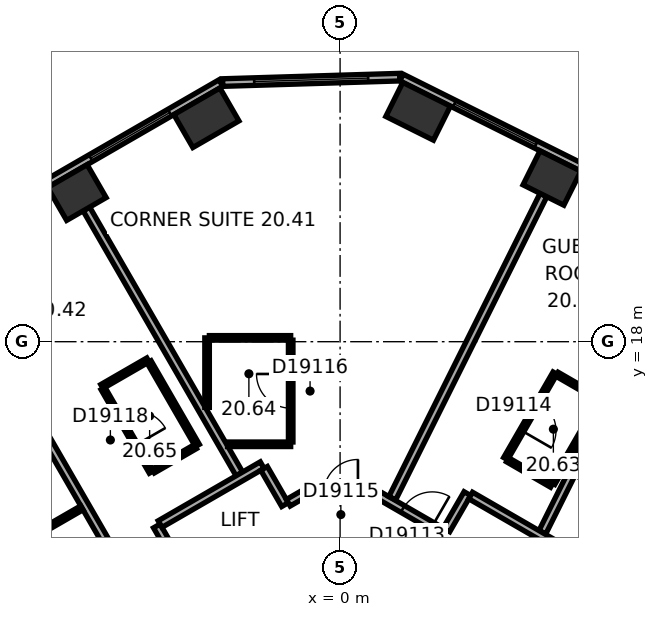
"""IFC4 building model, lengths in metres.
Left out: names, types, materials, properties, quantities, classifications, styles, units other than length and angle.
Written with IfcOpenShell. Run it as: python <this file> out.ifc"""

import sys

from ifc_helpers import new_model, si_unit, direction, frame, frame_2d, origin, origin_2d, place, context, subcontext, project, spatial, rectangle, extrude, element, fill, save


model = new_model("IFC4")
c1 = context("Model", 3, precision=1e-05, world=origin(), true_north=direction((0.0, 1.0)))
c2 = subcontext(c1, "Body", "Model", "MODEL_VIEW")
j1 = project(units=[si_unit("LENGTHUNIT", "METRE"), si_unit("PLANEANGLEUNIT", "RADIAN")], contexts=[c1])
p1 = place(None, origin())
s1 = spatial("IfcSite", under=j1, at=p1, CompositionType="ELEMENT")
p2 = place(p1, origin())
s2 = spatial("IfcBuilding", under=s1, at=p2, CompositionType="ELEMENT")
p3 = place(p2, frame((0.0, 0.0, 90.2)))
s3 = spatial("IfcBuildingStorey", under=s2, at=p3, CompositionType="ELEMENT", Elevation=90.2)
p4 = place(p3, frame((5.574, 22.306, 0.0), z_axis=(0.0, 0.0, 1.0), x_axis=(-0.894934361602, 0.44619781311, 0.0)))
e1 = element("IfcColumn", 1, at=p4, inside=s3, PredefinedType="COLUMN", context=c2, shape_type="SweptSolid", body=[
    extrude(rectangle(XDim=1.2, YDim=1.0, at=origin_2d()), origin(), (0.0, 0.0, 1.0), 3.3),
])
for number, where, z_axis, x_axis in (
    (2, (2.053, 24.062, 0.0), (0.0, 0.0, 1.0), (-0.895, 0.446, 0.0)),
    (3, (-3.518, 23.892, 0.0), (0.0, 0.0, 1.0), (-0.866, -0.5, 0.0)),
):
    element("IfcColumn", number, at=place(p3, frame(where, z_axis=z_axis, x_axis=x_axis)), inside=s3, PredefinedType="COLUMN", context=c2, shape_type="SweptSolid", body=[
        extrude(rectangle(XDim=1.4, YDim=1.0, at=origin_2d()), origin(), (0.0, 0.0, 1.0), 3.3),
    ])
p5 = place(p3, frame((-6.926, 21.925, 0.0), z_axis=(0.0, 0.0, 1.0), x_axis=(-0.866025403784, -0.5, 0.0)))
e4 = element("IfcColumn", 4, at=p5, inside=s3, PredefinedType="COLUMN", context=c2, shape_type="SweptSolid", body=[
    extrude(rectangle(XDim=1.2, YDim=1.0, at=origin_2d()), origin(), (0.0, 0.0, 1.0), 3.3),
])
p6 = place(p3, frame((20.63, 15.47, 0.0), z_axis=(0.0, 0.0, 1.0), x_axis=(-0.894934518609, 0.446197498203, 0.0)))
e5 = element("IfcWall", 5, at=p6, inside=s3, PredefinedType="STANDARD", context=c2, shape_type="SweptSolid", body=[
    extrude(rectangle(XDim=21.246, YDim=0.2, at=frame_2d((10.623, 0.0))), origin(), (0.0, 0.0, 1.0), 3.3),
])
p7 = place(p6, frame((1.553, 0.0, 0.8)))
e6 = element("IfcOpeningElement", 6, at=p7, cuts=e5, PredefinedType="OPENING", context=c2, shape_type="SweptSolid", body=[
    extrude(rectangle(XDim=2.4, YDim=1.7, at=frame_2d((1.2, 0.85))), frame((0.0, 0.11, 0.0), z_axis=(0.0, -1.0, 0.0), x_axis=(1.0, 0.0, 0.0)), (0.0, 0.0, 1.0), 0.22),
])
p8 = place(p6, frame((5.488, 0.0, 0.8)))
e7 = element("IfcOpeningElement", 7, at=p8, cuts=e5, PredefinedType="OPENING", context=c2, shape_type="SweptSolid", body=[
    extrude(rectangle(XDim=2.4, YDim=1.7, at=frame_2d((1.2, 0.85))), frame((0.0, 0.11, 0.0), z_axis=(0.0, -1.0, 0.0), x_axis=(1.0, 0.0, 0.0)), (0.0, 0.0, 1.0), 0.22),
])
p9 = place(p6, frame((9.422, 0.0, 0.8)))
e8 = element("IfcOpeningElement", 8, at=p9, cuts=e5, PredefinedType="OPENING", context=c2, shape_type="SweptSolid", body=[
    extrude(rectangle(XDim=2.4, YDim=1.7, at=frame_2d((1.2, 0.85))), frame((0.0, 0.11, 0.0), z_axis=(0.0, -1.0, 0.0), x_axis=(1.0, 0.0, 0.0)), (0.0, 0.0, 1.0), 0.22),
])
p10 = place(p6, frame((13.357, 0.0, 0.8)))
e9 = element("IfcOpeningElement", 9, at=p10, cuts=e5, PredefinedType="OPENING", context=c2, shape_type="SweptSolid", body=[
    extrude(rectangle(XDim=2.4, YDim=1.7, at=frame_2d((1.2, 0.85))), frame((0.0, 0.11, 0.0), z_axis=(0.0, -1.0, 0.0), x_axis=(1.0, 0.0, 0.0)), (0.0, 0.0, 1.0), 0.22),
])
p11 = place(p6, frame((17.292, 0.0, 0.8)))
e10 = element("IfcOpeningElement", 10, at=p11, cuts=e5, PredefinedType="OPENING", context=c2, shape_type="SweptSolid", body=[
    extrude(rectangle(XDim=2.4, YDim=1.7, at=frame_2d((1.2, 0.85))), frame((0.0, 0.11, 0.0), z_axis=(0.0, -1.0, 0.0), x_axis=(1.0, 0.0, 0.0)), (0.0, 0.0, 1.0), 0.22),
])
p12 = place(p3, frame((1.568, 24.961, 0.0), z_axis=(0.0, 0.0, 1.0), x_axis=(-0.999533359013, -0.030546099927, 0.0)))
e11 = element("IfcWall", 11, at=p12, inside=s3, PredefinedType="STANDARD", context=c2, shape_type="SweptSolid", body=[
    extrude(rectangle(XDim=4.66, YDim=0.2, at=frame_2d((2.33, 0.0))), origin(), (0.0, 0.0, 1.0), 3.3),
])
p13 = place(p12, frame((0.83, 0.0, 0.8)))
e12 = element("IfcOpeningElement", 12, at=p13, cuts=e11, PredefinedType="OPENING", context=c2, shape_type="SweptSolid", body=[
    extrude(rectangle(XDim=3.0, YDim=1.7, at=frame_2d((1.5, 0.85))), frame((0.0, 0.11, 0.0), z_axis=(0.0, -1.0, 0.0), x_axis=(1.0, 0.0, 0.0)), (0.0, 0.0, 1.0), 0.22),
])
p14 = place(p3, frame((-3.136, 24.805, 0.0), z_axis=(0.0, 0.0, 1.0), x_axis=(-0.866028291626, -0.499994998079, 0.0)))
e13 = element("IfcWall", 13, at=p14, inside=s3, PredefinedType="STANDARD", context=c2, shape_type="SweptSolid", body=[
    extrude(rectangle(XDim=21.246, YDim=0.2, at=frame_2d((10.623, 0.0))), origin(), (0.0, 0.0, 1.0), 3.3),
])
p15 = place(p14, frame((1.555, 0.0, 0.8)))
e14 = element("IfcOpeningElement", 14, at=p15, cuts=e13, PredefinedType="OPENING", context=c2, shape_type="SweptSolid", body=[
    extrude(rectangle(XDim=2.4, YDim=1.7, at=frame_2d((1.2, 0.85))), frame((0.0, 0.11, 0.0), z_axis=(0.0, -1.0, 0.0), x_axis=(1.0, 0.0, 0.0)), (0.0, 0.0, 1.0), 0.22),
])
p16 = place(p14, frame((5.489, 0.0, 0.8)))
e15 = element("IfcOpeningElement", 15, at=p16, cuts=e13, PredefinedType="OPENING", context=c2, shape_type="SweptSolid", body=[
    extrude(rectangle(XDim=2.4, YDim=1.7, at=frame_2d((1.2, 0.85))), frame((0.0, 0.11, 0.0), z_axis=(0.0, -1.0, 0.0), x_axis=(1.0, 0.0, 0.0)), (0.0, 0.0, 1.0), 0.22),
])
p17 = place(p14, frame((9.424, 0.0, 0.8)))
e16 = element("IfcOpeningElement", 16, at=p17, cuts=e13, PredefinedType="OPENING", context=c2, shape_type="SweptSolid", body=[
    extrude(rectangle(XDim=2.4, YDim=1.7, at=frame_2d((1.2, 0.85))), frame((0.0, 0.11, 0.0), z_axis=(0.0, -1.0, 0.0), x_axis=(1.0, 0.0, 0.0)), (0.0, 0.0, 1.0), 0.22),
])
p18 = place(p14, frame((13.358, 0.0, 0.8)))
e17 = element("IfcOpeningElement", 17, at=p18, cuts=e13, PredefinedType="OPENING", context=c2, shape_type="SweptSolid", body=[
    extrude(rectangle(XDim=2.4, YDim=1.7, at=frame_2d((1.2, 0.85))), frame((0.0, 0.11, 0.0), z_axis=(0.0, -1.0, 0.0), x_axis=(1.0, 0.0, 0.0)), (0.0, 0.0, 1.0), 0.22),
])
p19 = place(p14, frame((17.293, 0.0, 0.8)))
e18 = element("IfcOpeningElement", 18, at=p19, cuts=e13, PredefinedType="OPENING", context=c2, shape_type="SweptSolid", body=[
    extrude(rectangle(XDim=2.4, YDim=1.7, at=frame_2d((1.2, 0.85))), frame((0.0, 0.11, 0.0), z_axis=(0.0, -1.0, 0.0), x_axis=(1.0, 0.0, 0.0)), (0.0, 0.0, 1.0), 0.22),
])
p20 = place(p3, frame((-10.083, 19.524, 0.0), z_axis=(0.0, 0.0, 1.0), x_axis=(0.499999662836, -0.866025598446, 0.0)))
e19 = element("IfcWall", 19, at=p20, inside=s3, PredefinedType="PARTITIONING", context=c2, shape_type="SweptSolid", body=[
    extrude(rectangle(XDim=9.25, YDim=0.2, at=frame_2d((4.625, 0.0))), origin(), (0.0, 0.0, 1.0), 2.6),
])
p21 = place(p3, frame((-8.44, 12.679, 0.0), z_axis=(0.0, 0.0, 1.0), x_axis=(0.866044365799, 0.499967155389, 0.0)))
e20 = element("IfcWall", 20, at=p21, inside=s3, PredefinedType="PARTITIONING", context=c2, shape_type="SweptSolid", body=[
    extrude(rectangle(XDim=1.9, YDim=0.12, at=frame_2d((0.95, 0.0))), origin(), (0.0, 0.0, 1.0), 3.05),
])
p22 = place(p3, frame((-6.676, 21.492, 0.0), z_axis=(0.0, 0.0, 1.0), x_axis=(0.500011263043, -0.866018900966, 0.0)))
e21 = element("IfcWall", 21, at=p22, inside=s3, PredefinedType="PARTITIONING", context=c2, shape_type="SweptSolid", body=[
    extrude(rectangle(XDim=8.049, YDim=0.2, at=frame_2d((4.024, 0.0))), origin(), (0.0, 0.0, 1.0), 3.05),
])
p23 = place(p3, frame((-6.268, 16.82, 0.0), z_axis=(0.0, 0.0, 1.0), x_axis=(0.866002662425, 0.500039387122, 0.0)))
e22 = element("IfcWall", 22, at=p23, inside=s3, PredefinedType="PARTITIONING", context=c2, shape_type="SweptSolid", body=[
    extrude(rectangle(XDim=1.4, YDim=0.12, at=frame_2d((0.7, 0.0))), origin(), (0.0, 0.0, 1.0), 3.05),
])
p24 = place(p3, frame((-5.026, 17.469, 0.0), z_axis=(0.0, 0.0, 1.0), x_axis=(0.500005339912, -0.866022320763, 0.0)))
e23 = element("IfcWall", 23, at=p24, inside=s3, PredefinedType="PARTITIONING", context=c2, shape_type="SweptSolid", body=[
    extrude(rectangle(XDim=2.54, YDim=0.12, at=frame_2d((1.27, 0.0))), origin(), (0.0, 0.0, 1.0), 3.05),
])
p25 = place(p3, frame((-4.968, 14.569, 0.0), z_axis=(0.0, 0.0, 1.0), x_axis=(-0.500046963369, 0.865998287773, 0.0)))
e24 = element("IfcWall", 24, at=p25, inside=s3, PredefinedType="PARTITIONING", context=c2, shape_type="SweptSolid", body=[
    extrude(rectangle(XDim=2.54, YDim=0.12, at=frame_2d((1.27, 0.0))), origin(), (0.0, 0.0, 1.0), 3.05),
])
p26 = place(p25, frame((0.82, 0.0, 0.0)))
e25 = element("IfcOpeningElement", 25, at=p26, cuts=e24, PredefinedType="OPENING", context=c2, shape_type="SweptSolid", body=[
    extrude(rectangle(XDim=0.9, YDim=2.1, at=frame_2d((0.45, 1.05))), frame((0.0, 0.07, 0.0), z_axis=(0.0, -1.0, 0.0), x_axis=(1.0, 0.0, 0.0)), (0.0, 0.0, 1.0), 0.14),
])
p27 = place(p3, frame((-4.823, 13.152, 0.0), z_axis=(0.0, 0.0, 1.0), x_axis=(0.499986357472, -0.866033280158, 0.0)))
e26 = element("IfcWall", 26, at=p27, inside=s3, PredefinedType="PARTITIONING", context=c2, shape_type="SweptSolid", body=[
    extrude(rectangle(XDim=1.201, YDim=0.2, at=frame_2d((0.601, 0.0))), origin(), (0.0, 0.0, 1.0), 3.05),
])
p28 = place(p3, frame((-3.808, 15.239, 0.0), z_axis=(0.0, 0.0, 1.0), x_axis=(-0.866087136806, -0.499893060024, 0.0)))
e27 = element("IfcWall", 27, at=p28, inside=s3, PredefinedType="PARTITIONING", context=c2, shape_type="SweptSolid", body=[
    extrude(rectangle(XDim=1.28, YDim=0.12, at=frame_2d((0.64, 0.0))), origin(), (0.0, 0.0, 1.0), 3.05),
])
p29 = place(p3, frame((-3.5, 16.271, 0.0), z_axis=(0.0, 0.0, 1.0), x_axis=(0.0, 1.0, 0.0)))
e28 = element("IfcWall", 28, at=p29, inside=s3, PredefinedType="PARTITIONING", context=c2, shape_type="SweptSolid", body=[
    extrude(rectangle(XDim=1.829, YDim=0.12, at=frame_2d((0.915, 0.0))), origin(), (0.0, 0.0, 1.0), 3.05),
])
p30 = place(p3, frame((-3.44, 18.101, 0.0), z_axis=(0.0, 0.0, 1.0), x_axis=(1.0, 0.0, 0.0)))
e29 = element("IfcWall", 29, at=p30, inside=s3, PredefinedType="PARTITIONING", context=c2, shape_type="SweptSolid", body=[
    extrude(rectangle(XDim=2.14, YDim=0.12, at=frame_2d((1.07, 0.0))), origin(), (0.0, 0.0, 1.0), 3.05),
])
p31 = place(p3, frame((-2.05, 14.752, 0.0), z_axis=(0.0, 0.0, 1.0), x_axis=(-0.866030936828, -0.499990416364, 0.0)))
e30 = element("IfcWall", 30, at=p31, inside=s3, PredefinedType="PARTITIONING", context=c2, shape_type="SweptSolid", body=[
    extrude(rectangle(XDim=3.102, YDim=0.2, at=frame_2d((1.551, 0.0))), origin(), (0.0, 0.0, 1.0), 3.05),
])
p32 = place(p3, frame((-1.449, 13.712, 0.0), z_axis=(0.0, 0.0, 1.0), x_axis=(-0.499978356969, 0.866037899034, 0.0)))
e31 = element("IfcWall", 31, at=p32, inside=s3, PredefinedType="PARTITIONING", context=c2, shape_type="SweptSolid", body=[
    extrude(rectangle(XDim=1.101, YDim=0.2, at=frame_2d((0.551, 0.0))), origin(), (0.0, 0.0, 1.0), 3.05),
])
p33 = place(p3, frame((-1.3, 15.301, 0.0), z_axis=(0.0, 0.0, 1.0), x_axis=(-1.0, 0.0, 0.0)))
e32 = element("IfcWall", 32, at=p33, inside=s3, PredefinedType="PARTITIONING", context=c2, shape_type="SweptSolid", body=[
    extrude(rectangle(XDim=1.661, YDim=0.12, at=frame_2d((0.831, 0.0))), origin(), (0.0, 0.0, 1.0), 3.05),
])
p34 = place(p3, frame((-1.3, 18.041, 0.0), z_axis=(0.0, 0.0, 1.0), x_axis=(0.0, -1.0, 0.0)))
e33 = element("IfcWall", 33, at=p34, inside=s3, PredefinedType="PARTITIONING", context=c2, shape_type="SweptSolid", body=[
    extrude(rectangle(XDim=2.68, YDim=0.12, at=frame_2d((1.34, 0.0))), origin(), (0.0, 0.0, 1.0), 3.05),
])
p35 = place(p34, frame((0.89, 0.0, 0.0)))
e34 = element("IfcOpeningElement", 34, at=p35, cuts=e33, PredefinedType="OPENING", context=c2, shape_type="SweptSolid", body=[
    extrude(rectangle(XDim=0.9, YDim=2.1, at=frame_2d((0.45, 1.05))), frame((0.0, 0.07, 0.0), z_axis=(0.0, -1.0, 0.0), x_axis=(1.0, 0.0, 0.0)), (0.0, 0.0, 1.0), 0.14),
])
p36 = place(p3, frame((-0.95, 14.001, 0.0), z_axis=(0.0, 0.0, 1.0), x_axis=(-0.86609177584, -0.499885022602, 0.0)))
e35 = element("IfcWall", 35, at=p36, inside=s3, PredefinedType="PARTITIONING", context=c2, shape_type="SweptSolid", body=[
    extrude(rectangle(XDim=0.477, YDim=0.2, at=frame_2d((0.238, 0.0))), origin(), (0.0, 0.0, 1.0), 3.05),
])
p37 = place(p3, frame((0.95, 14.001, 0.0), z_axis=(0.0, 0.0, 1.0), x_axis=(-1.0, 0.0, 0.0)))
e36 = element("IfcWall", 36, at=p37, inside=s3, PredefinedType="PARTITIONING", context=c2, shape_type="SweptSolid", body=[
    extrude(rectangle(XDim=1.86, YDim=0.2, at=frame_2d((0.93, 0.0))), origin(), (0.0, 0.0, 1.0), 3.05),
])
p38 = place(p37, frame((0.48, 0.0, 0.0)))
e37 = element("IfcOpeningElement", 37, at=p38, cuts=e36, PredefinedType="OPENING", context=c2, shape_type="SweptSolid", body=[
    extrude(rectangle(XDim=0.9, YDim=2.1, at=frame_2d((0.45, 1.05))), frame((0.0, 0.11, 0.0), z_axis=(0.0, -1.0, 0.0), x_axis=(1.0, 0.0, 0.0)), (0.0, 0.0, 1.0), 0.22),
])
p39 = place(p3, frame((2.748, 12.962, 0.0), z_axis=(0.0, 0.0, 1.0), x_axis=(-0.866013897511, 0.50001992892, 0.0)))
e38 = element("IfcWall", 38, at=p39, inside=s3, PredefinedType="PARTITIONING", context=c2, shape_type="SweptSolid", body=[
    extrude(rectangle(XDim=2.037, YDim=0.2, at=frame_2d((1.018, 0.0))), origin(), (0.0, 0.0, 1.0), 3.05),
])
p40 = place(p39, frame((0.372, 0.0, 0.0)))
e39 = element("IfcOpeningElement", 39, at=p40, cuts=e38, PredefinedType="OPENING", context=c2, shape_type="SweptSolid", body=[
    extrude(rectangle(XDim=0.9, YDim=2.1, at=frame_2d((0.45, 1.05))), frame((0.0, 0.11, 0.0), z_axis=(0.0, -1.0, 0.0), x_axis=(1.0, 0.0, 0.0)), (0.0, 0.0, 1.0), 0.22),
])
p41 = place(p3, frame((3.349, 14.002, 0.0), z_axis=(0.0, 0.0, 1.0), x_axis=(-0.500074377092, -0.865982457891, 0.0)))
e40 = element("IfcWall", 40, at=p41, inside=s3, PredefinedType="PARTITIONING", context=c2, shape_type="SweptSolid", body=[
    extrude(rectangle(XDim=1.101, YDim=0.2, at=frame_2d((0.55, 0.0))), origin(), (0.0, 0.0, 1.0), 3.05),
])
p42 = place(p3, frame((4.356, 14.922, 0.0), z_axis=(0.0, 0.0, 1.0), x_axis=(0.499936506574, 0.866062058628, 0.0)))
e41 = element("IfcWall", 41, at=p42, inside=s3, PredefinedType="PARTITIONING", context=c2, shape_type="SweptSolid", body=[
    extrude(rectangle(XDim=2.6, YDim=0.12, at=frame_2d((1.3, 0.0))), origin(), (0.0, 0.0, 1.0), 3.05),
])
p43 = place(p42, frame((0.85, 0.0, 0.0)))
e42 = element("IfcOpeningElement", 42, at=p43, cuts=e41, PredefinedType="OPENING", context=c2, shape_type="SweptSolid", body=[
    extrude(rectangle(XDim=0.9, YDim=2.1, at=frame_2d((0.45, 1.05))), frame((0.0, 0.07, 0.0), z_axis=(0.0, -1.0, 0.0), x_axis=(1.0, 0.0, 0.0)), (0.0, 0.0, 1.0), 0.14),
])
p44 = place(p3, frame((5.351, 21.859, 0.0), z_axis=(0.0, 0.0, 1.0), x_axis=(-0.446205309328, -0.894930624086, 0.0)))
e43 = element("IfcWall", 43, at=p44, inside=s3, PredefinedType="PARTITIONING", context=c2, shape_type="SweptSolid", body=[
    extrude(rectangle(XDim=8.913, YDim=0.2, at=frame_2d((4.457, 0.0))), origin(), (0.0, 0.0, 1.0), 2.6),
])
p45 = place(p3, frame((5.569, 14.222, 0.0), z_axis=(0.0, 0.0, 1.0), x_axis=(-0.866036909293, 0.499980071345, 0.0)))
e44 = element("IfcWall", 44, at=p45, inside=s3, PredefinedType="PARTITIONING", context=c2, shape_type="SweptSolid", body=[
    extrude(rectangle(XDim=1.34, YDim=0.12, at=frame_2d((0.67, 0.0))), origin(), (0.0, 0.0, 1.0), 3.05),
])
p46 = place(p3, frame((5.708, 17.144, 0.0), z_axis=(0.0, 0.0, 1.0), x_axis=(0.866082447003, -0.499901185229, 0.0)))
e45 = element("IfcWall", 45, at=p46, inside=s3, PredefinedType="PARTITIONING", context=c2, shape_type="SweptSolid", body=[
    extrude(rectangle(XDim=1.34, YDim=0.12, at=frame_2d((0.67, 0.0))), origin(), (0.0, 0.0, 1.0), 3.05),
])
p47 = place(p3, frame((6.839, 16.422, 0.0), z_axis=(0.0, 0.0, 1.0), x_axis=(-0.50000366821, -0.866023285932, 0.0)))
e46 = element("IfcWall", 46, at=p47, inside=s3, PredefinedType="PARTITIONING", context=c2, shape_type="SweptSolid", body=[
    extrude(rectangle(XDim=2.48, YDim=0.12, at=frame_2d((1.24, 0.0))), origin(), (0.0, 0.0, 1.0), 3.05),
])
p48 = place(p3, frame((8.872, 20.104, 0.0), z_axis=(0.0, 0.0, 1.0), x_axis=(-0.446218378653, -0.894924107706, 0.0)))
e47 = element("IfcWall", 47, at=p48, inside=s3, PredefinedType="PARTITIONING", context=c2, shape_type="SweptSolid", body=[
    extrude(rectangle(XDim=7.95, YDim=0.2, at=frame_2d((3.975, 0.0))), origin(), (0.0, 0.0, 1.0), 3.05),
])
p49 = place(p3, frame((10.885, 9.652, 0.0), z_axis=(0.0, 0.0, 1.0), x_axis=(-0.866033868542, 0.499985338323, 0.0)))
e48 = element("IfcWall", 48, at=p49, inside=s3, PredefinedType="PARTITIONING", context=c2, shape_type="SweptSolid", body=[
    extrude(rectangle(XDim=8.602, YDim=0.2, at=frame_2d((4.301, 0.0))), origin(), (0.0, 0.0, 1.0), 3.05),
])
p50 = place(p49, frame((2.739, 0.0, 0.0)))
e49 = element("IfcOpeningElement", 49, at=p50, cuts=e48, PredefinedType="OPENING", context=c2, shape_type="SweptSolid", body=[
    extrude(rectangle(XDim=1.0, YDim=2.1, at=frame_2d((0.5, 1.05))), frame((0.0, 0.11, 0.0), z_axis=(0.0, -1.0, 0.0), x_axis=(1.0, 0.0, 0.0)), (0.0, 0.0, 1.0), 0.22),
])
p51 = place(p3, frame((12.866, 10.702, 0.0), z_axis=(0.0, 0.0, 1.0), x_axis=(-0.866023151433, 0.500003901167, 0.0)))
e50 = element("IfcWall", 50, at=p51, inside=s3, PredefinedType="PARTITIONING", context=c2, shape_type="SweptSolid", body=[
    extrude(rectangle(XDim=7.684, YDim=0.12, at=frame_2d((3.842, 0.0))), origin(), (0.0, 0.0, 1.0), 3.05),
])
p52 = place(p51, frame((0.55, 0.0, 0.0)))
e51 = element("IfcOpeningElement", 51, at=p52, cuts=e50, PredefinedType="OPENING", context=c2, shape_type="SweptSolid", body=[
    extrude(rectangle(XDim=1.0, YDim=2.1, at=frame_2d((0.5, 1.05))), frame((0.0, 0.07, 0.0), z_axis=(0.0, -1.0, 0.0), x_axis=(1.0, 0.0, 0.0)), (0.0, 0.0, 1.0), 0.14),
])
p53 = place(p51, frame((2.8, 0.0, 0.0)))
e52 = element("IfcOpeningElement", 52, at=p53, cuts=e50, PredefinedType="OPENING", context=c2, shape_type="SweptSolid", body=[
    extrude(rectangle(XDim=0.9, YDim=2.1, at=frame_2d((0.45, 1.05))), frame((0.0, 0.07, 0.0), z_axis=(0.0, -1.0, 0.0), x_axis=(1.0, 0.0, 0.0)), (0.0, 0.0, 1.0), 0.14),
])
p54 = place(p51, frame((5.592, 0.0, 0.0)))
e53 = element("IfcOpeningElement", 53, at=p54, cuts=e50, PredefinedType="OPENING", context=c2, shape_type="SweptSolid", body=[
    extrude(rectangle(XDim=0.9, YDim=2.1, at=frame_2d((0.45, 1.05))), frame((0.0, 0.07, 0.0), z_axis=(0.0, -1.0, 0.0), x_axis=(1.0, 0.0, 0.0)), (0.0, 0.0, 1.0), 0.14),
])
p55 = place(p11, origin())
e54 = element("IfcWindow", 54, at=p55, inside=s3, PartitioningType="SINGLE_PANEL", PredefinedType="WINDOW", context=c2, shape_type="SweptSolid", body=[
    extrude(rectangle(XDim=2.4, YDim=1.7, at=frame_2d((1.2, 0.85))), frame((0.0, 0.03, 0.0), z_axis=(0.0, -1.0, 0.0), x_axis=(1.0, 0.0, 0.0)), (0.0, 0.0, 1.0), 0.06),
])
fill(e10, e54)
p56 = place(p13, origin())
e55 = element("IfcWindow", 55, at=p56, inside=s3, PartitioningType="SINGLE_PANEL", PredefinedType="WINDOW", context=c2, shape_type="SweptSolid", body=[
    extrude(rectangle(XDim=3.0, YDim=1.7, at=frame_2d((1.5, 0.85))), frame((0.0, 0.03, 0.0), z_axis=(0.0, -1.0, 0.0), x_axis=(1.0, 0.0, 0.0)), (0.0, 0.0, 1.0), 0.06),
])
fill(e12, e55)
p57 = place(p15, origin())
e56 = element("IfcWindow", 56, at=p57, inside=s3, PartitioningType="SINGLE_PANEL", PredefinedType="WINDOW", context=c2, shape_type="SweptSolid", body=[
    extrude(rectangle(XDim=2.4, YDim=1.7, at=frame_2d((1.2, 0.85))), frame((0.0, 0.03, 0.0), z_axis=(0.0, -1.0, 0.0), x_axis=(1.0, 0.0, 0.0)), (0.0, 0.0, 1.0), 0.06),
])
fill(e14, e56)
p58 = place(p40, origin())
e57 = element("IfcDoor", 57, at=p58, inside=s3, OperationType="SINGLE_SWING_LEFT", PredefinedType="DOOR", context=c2, shape_type="SweptSolid", body=[
    extrude(rectangle(XDim=0.9, YDim=2.1, at=frame_2d((0.45, 1.05))), frame((0.0, 0.025, 0.0), z_axis=(0.0, -1.0, 0.0), x_axis=(1.0, 0.0, 0.0)), (0.0, 0.0, 1.0), 0.05),
])
fill(e39, e57)
p59 = place(p43, origin())
e58 = element("IfcDoor", 58, at=p59, inside=s3, OperationType="SINGLE_SWING_LEFT", PredefinedType="DOOR", context=c2, shape_type="SweptSolid", body=[
    extrude(rectangle(XDim=0.9, YDim=2.1, at=frame_2d((0.45, 1.05))), frame((0.0, 0.025, 0.0), z_axis=(0.0, -1.0, 0.0), x_axis=(1.0, 0.0, 0.0)), (0.0, 0.0, 1.0), 0.05),
])
fill(e42, e58)
p60 = place(p38, origin())
e59 = element("IfcDoor", 59, at=p60, inside=s3, OperationType="SINGLE_SWING_LEFT", PredefinedType="DOOR", context=c2, shape_type="SweptSolid", body=[
    extrude(rectangle(XDim=0.9, YDim=2.1, at=frame_2d((0.45, 1.05))), frame((0.0, 0.025, 0.0), z_axis=(0.0, -1.0, 0.0), x_axis=(1.0, 0.0, 0.0)), (0.0, 0.0, 1.0), 0.05),
])
fill(e37, e59)
p61 = place(p35, origin())
e60 = element("IfcDoor", 60, at=p61, inside=s3, OperationType="SINGLE_SWING_LEFT", PredefinedType="DOOR", context=c2, shape_type="SweptSolid", body=[
    extrude(rectangle(XDim=0.9, YDim=2.1, at=frame_2d((0.45, 1.05))), frame((0.0, 0.025, 0.0), z_axis=(0.0, -1.0, 0.0), x_axis=(1.0, 0.0, 0.0)), (0.0, 0.0, 1.0), 0.05),
])
fill(e34, e60)
p62 = place(p26, origin())
e61 = element("IfcDoor", 61, at=p62, inside=s3, OperationType="SINGLE_SWING_LEFT", PredefinedType="DOOR", context=c2, shape_type="SweptSolid", body=[
    extrude(rectangle(XDim=0.9, YDim=2.1, at=frame_2d((0.45, 1.05))), frame((0.0, 0.025, 0.0), z_axis=(0.0, -1.0, 0.0), x_axis=(1.0, 0.0, 0.0)), (0.0, 0.0, 1.0), 0.05),
])
fill(e25, e61)
save(model, sys.argv[1])
